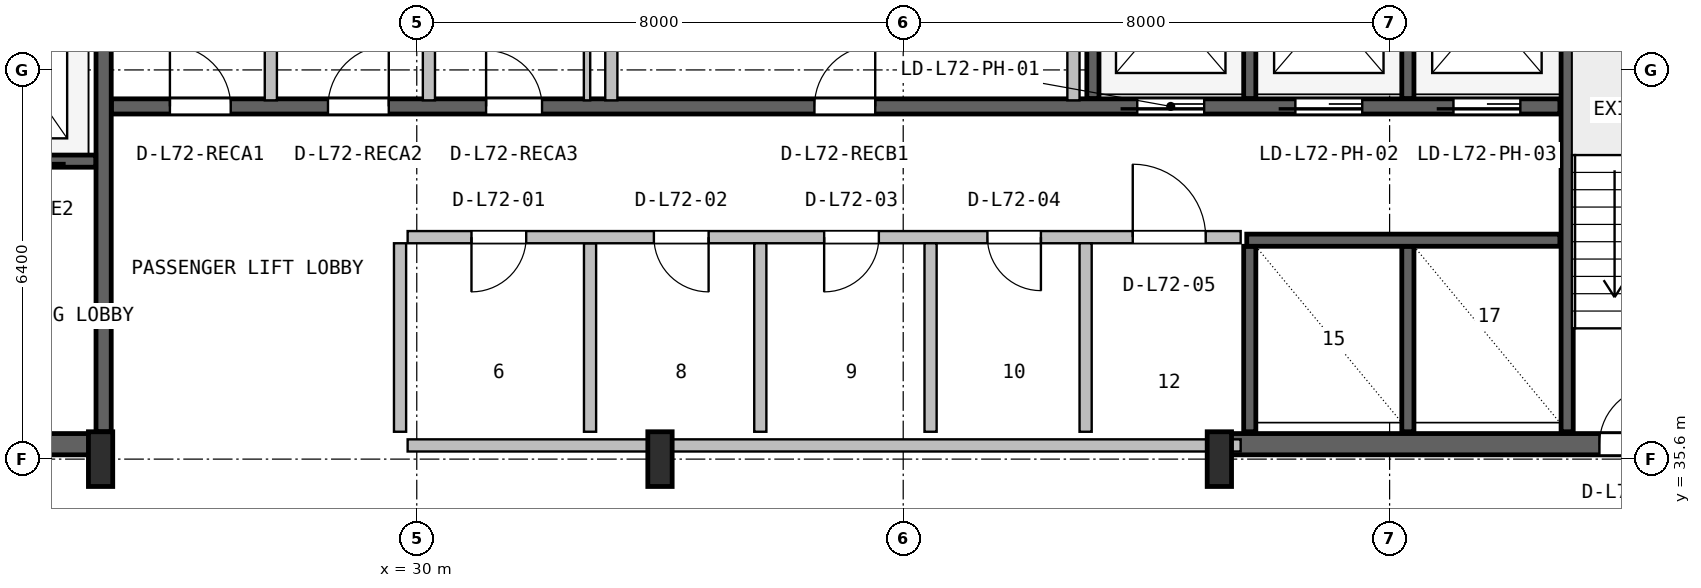
"""IFC4 building model, lengths in metres.
Left out: names, types, materials, properties, quantities, classifications, styles, units other than length and angle.
Written with IfcOpenShell. Run it as: python <this file> out.ifc"""

import sys

from ifc_helpers import new_model, si_unit, direction, frame, frame_2d, origin, origin_2d, place, context, subcontext, project, spatial, rectangle, i_section, extrude, source, transform, mapped, element, fill, save


model = new_model("IFC4")
c1 = context("Model", 3, precision=1e-05, world=origin(), true_north=direction((0.0, 1.0)))
c2 = subcontext(c1, "Body", "Model", "MODEL_VIEW")
j1 = project(units=[si_unit("LENGTHUNIT", "METRE"), si_unit("PLANEANGLEUNIT", "RADIAN")], contexts=[c1])
p1 = place(None, origin())
s1 = spatial("IfcSite", under=j1, at=p1, CompositionType="ELEMENT")
p2 = place(p1, origin())
s2 = spatial("IfcBuilding", under=s1, at=p2, CompositionType="ELEMENT")
p3 = place(p2, frame((0.0, 0.0, 288.8)))
s3 = spatial("IfcBuildingStorey", under=s2, at=p3, CompositionType="ELEMENT", Elevation=288.8)
p4 = place(p3, frame((15.67, 35.845, 0.0), z_axis=(0.0, 0.0, 1.0), x_axis=(1.0, 0.0, 0.0)))
e1 = element("IfcWall", 1, at=p4, inside=s3, PredefinedType="SHEAR", context=c2, shape_type="SweptSolid", body=[
    extrude(rectangle(XDim=9.13, YDim=0.35, at=frame_2d((4.565, 0.0))), origin(), (0.0, 0.0, 1.0), 3.55),
])
p5 = place(p4, frame((5.4, 0.0, 0.0)))
e2 = element("IfcOpeningElement", 2, at=p5, cuts=e1, PredefinedType="OPENING", context=c2, shape_type="SweptSolid", body=[
    extrude(rectangle(XDim=1.0, YDim=2.1, at=frame_2d((0.5, 1.05))), frame((0.0, 0.185, 0.0), z_axis=(0.0, -1.0, 0.0), x_axis=(1.0, 0.0, 0.0)), (0.0, 0.0, 1.0), 0.37),
])
p6 = place(p3, frame((43.2, 35.845, 0.0), z_axis=(0.0, 0.0, 1.0), x_axis=(1.0, 0.0, 0.0)))
e3 = element("IfcWall", 3, at=p6, inside=s3, PredefinedType="SHEAR", context=c2, shape_type="SweptSolid", body=[
    extrude(rectangle(XDim=9.13, YDim=0.35, at=frame_2d((4.565, 0.0))), origin(), (0.0, 0.0, 1.0), 3.55),
])
p7 = place(p6, frame((6.25, 0.0, 0.0)))
e4 = element("IfcOpeningElement", 4, at=p7, cuts=e3, PredefinedType="OPENING", context=c2, shape_type="SweptSolid", body=[
    extrude(rectangle(XDim=0.95, YDim=2.1, at=frame_2d((0.475, 1.05))), frame((0.0, 0.185, 0.0), z_axis=(0.0, -1.0, 0.0), x_axis=(1.0, 0.0, 0.0)), (0.0, 0.0, 1.0), 0.37),
])
m1 = source(origin(), c2, "Body", "SweptSolid", [
    extrude(i_section(OverallWidth=0.4, OverallDepth=0.9, WebThickness=0.016, FlangeThickness=0.028, FilletRadius=0.016, at=origin_2d()), origin(), (0.0, 0.0, 1.0), 3.8),
])
for number, where, z_axis, x_axis in (
    (5, (24.8, 35.6, 0.0), (0.0, 0.0, 1.0), (1.0, 0.0, 0.0)),
    (6, (34.0, 35.6, 0.0), (0.0, 0.0, 1.0), (1.0, 0.0, 0.0)),
    (7, (43.2, 35.6, 0.0), (0.0, 0.0, 1.0), (1.0, 0.0, 0.0)),
):
    element("IfcColumn", number, at=place(p3, frame(where, z_axis=z_axis, x_axis=x_axis)), inside=s3, PredefinedType="COLUMN", context=c2, shape_type="MappedRepresentation", body=[
        mapped(m1, transform((0.0, 0.0, 0.0), x_axis=(1.0, 0.0, 0.0), y_axis=(0.0, 1.0, 0.0), z_axis=(0.0, 0.0, 1.0), scale=1.0)),
    ])
p8 = place(p3, frame((24.85, 36.05, 0.0), z_axis=(0.0, 0.0, 1.0), x_axis=(0.0, 1.0, 0.0)))
e8 = element("IfcWall", 8, at=p8, inside=s3, PredefinedType="SHEAR", context=c2, shape_type="SweptSolid", body=[
    extrude(rectangle(XDim=10.45, YDim=0.25, at=frame_2d((5.225, 0.0))), origin(), (0.0, 0.0, 1.0), 3.55),
])
p9 = place(p3, frame((19.2, 40.5, 0.0), z_axis=(0.0, 0.0, 1.0), x_axis=(1.0, 0.0, 0.0)))
e9 = element("IfcWall", 9, at=p9, inside=s3, PredefinedType="SHEAR", context=c2, shape_type="SweptSolid", body=[
    extrude(rectangle(XDim=5.52, YDim=0.2, at=frame_2d((2.76, 0.0))), origin(), (0.0, 0.0, 1.0), 3.55),
])
p10 = place(p9, frame((1.05, 0.0, 0.0)))
e10 = element("IfcOpeningElement", 10, at=p10, cuts=e9, PredefinedType="OPENING", context=c2, shape_type="SweptSolid", body=[
    extrude(rectangle(XDim=1.1, YDim=2.18, at=frame_2d((0.55, 1.09))), frame((0.0, 0.11, 0.0), z_axis=(0.0, -1.0, 0.0), x_axis=(1.0, 0.0, 0.0)), (0.0, 0.0, 1.0), 0.22),
])
p11 = place(p9, frame((3.65, 0.0, 0.0)))
e11 = element("IfcOpeningElement", 11, at=p11, cuts=e9, PredefinedType="OPENING", context=c2, shape_type="SweptSolid", body=[
    extrude(rectangle(XDim=1.1, YDim=2.18, at=frame_2d((0.55, 1.09))), frame((0.0, 0.11, 0.0), z_axis=(0.0, -1.0, 0.0), x_axis=(1.0, 0.0, 0.0)), (0.0, 0.0, 1.0), 0.22),
])
p12 = place(p3, frame((48.92, 36.05, 0.0), z_axis=(0.0, 0.0, 1.0), x_axis=(0.0, 1.0, 0.0)))
e12 = element("IfcWall", 12, at=p12, inside=s3, PredefinedType="SHEAR", context=c2, shape_type="SweptSolid", body=[
    extrude(rectangle(XDim=10.5, YDim=0.2, at=frame_2d((5.25, 0.0))), origin(), (0.0, 0.0, 1.0), 3.55),
])
p13 = place(p3, frame((24.98, 41.4, 0.0), z_axis=(0.0, 0.0, 1.0), x_axis=(1.0, 0.0, 0.0)))
e13 = element("IfcWall", 13, at=p13, inside=s3, PredefinedType="SHEAR", context=c2, shape_type="SweptSolid", body=[
    extrude(rectangle(XDim=23.82, YDim=0.25, at=frame_2d((11.91, 0.0))), origin(), (0.0, 0.0, 1.0), 3.55),
])
p14 = place(p13, frame((16.87, 0.0, 0.0)))
e14 = element("IfcOpeningElement", 14, at=p14, cuts=e13, PredefinedType="OPENING", context=c2, shape_type="SweptSolid", body=[
    extrude(rectangle(XDim=1.1, YDim=2.18, at=frame_2d((0.55, 1.09))), frame((0.0, 0.135, 0.0), z_axis=(0.0, -1.0, 0.0), x_axis=(1.0, 0.0, 0.0)), (0.0, 0.0, 1.0), 0.27),
])
p15 = place(p13, frame((19.47, 0.0, 0.0)))
e15 = element("IfcOpeningElement", 15, at=p15, cuts=e13, PredefinedType="OPENING", context=c2, shape_type="SweptSolid", body=[
    extrude(rectangle(XDim=1.1, YDim=2.18, at=frame_2d((0.55, 1.09))), frame((0.0, 0.135, 0.0), z_axis=(0.0, -1.0, 0.0), x_axis=(1.0, 0.0, 0.0)), (0.0, 0.0, 1.0), 0.27),
])
p16 = place(p13, frame((22.07, 0.0, 0.0)))
e16 = element("IfcOpeningElement", 16, at=p16, cuts=e13, PredefinedType="OPENING", context=c2, shape_type="SweptSolid", body=[
    extrude(rectangle(XDim=1.1, YDim=2.18, at=frame_2d((0.55, 1.09))), frame((0.0, 0.135, 0.0), z_axis=(0.0, -1.0, 0.0), x_axis=(1.0, 0.0, 0.0)), (0.0, 0.0, 1.0), 0.27),
])
p17 = place(p13, frame((0.96, 0.0, 0.0)))
e17 = element("IfcOpeningElement", 17, at=p17, cuts=e13, PredefinedType="OPENING", context=c2, shape_type="SweptSolid", body=[
    extrude(rectangle(XDim=1.0, YDim=2.08, at=frame_2d((0.5, 1.04))), frame((0.0, 0.135, 0.0), z_axis=(0.0, -1.0, 0.0), x_axis=(1.0, 0.0, 0.0)), (0.0, 0.0, 1.0), 0.27),
])
p18 = place(p13, frame((3.56, 0.0, 0.0)))
e18 = element("IfcOpeningElement", 18, at=p18, cuts=e13, PredefinedType="OPENING", context=c2, shape_type="SweptSolid", body=[
    extrude(rectangle(XDim=1.0, YDim=2.08, at=frame_2d((0.5, 1.04))), frame((0.0, 0.135, 0.0), z_axis=(0.0, -1.0, 0.0), x_axis=(1.0, 0.0, 0.0)), (0.0, 0.0, 1.0), 0.27),
])
p19 = place(p13, frame((6.16, 0.0, 0.0)))
e19 = element("IfcOpeningElement", 19, at=p19, cuts=e13, PredefinedType="OPENING", context=c2, shape_type="SweptSolid", body=[
    extrude(rectangle(XDim=0.92, YDim=2.08, at=frame_2d((0.46, 1.04))), frame((0.0, 0.135, 0.0), z_axis=(0.0, -1.0, 0.0), x_axis=(1.0, 0.0, 0.0)), (0.0, 0.0, 1.0), 0.27),
])
p20 = place(p13, frame((11.56, 0.0, 0.0)))
e20 = element("IfcOpeningElement", 20, at=p20, cuts=e13, PredefinedType="OPENING", context=c2, shape_type="SweptSolid", body=[
    extrude(rectangle(XDim=1.0, YDim=2.08, at=frame_2d((0.5, 1.04))), frame((0.0, 0.135, 0.0), z_axis=(0.0, -1.0, 0.0), x_axis=(1.0, 0.0, 0.0)), (0.0, 0.0, 1.0), 0.27),
])
p21 = place(p3, frame((41.12, 41.53, 0.0), z_axis=(0.0, 0.0, 1.0), x_axis=(0.0, 1.0, 0.0)))
e21 = element("IfcWall", 21, at=p21, inside=s3, PredefinedType="SHEAR", context=c2, shape_type="SweptSolid", body=[
    extrude(rectangle(XDim=5.02, YDim=0.2, at=frame_2d((2.51, 0.0))), origin(), (0.0, 0.0, 1.0), 3.55),
])
for number, where, z_axis, x_axis in (
    (22, (43.7, 41.53, 0.0), (0.0, 0.0, 1.0), (0.0, 1.0, 0.0)),
    (23, (46.3, 41.53, 0.0), (0.0, 0.0, 1.0), (0.0, 1.0, 0.0)),
):
    element("IfcWall", number, at=place(p3, frame(where, z_axis=z_axis, x_axis=x_axis)), inside=s3, PredefinedType="SHEAR", context=c2, shape_type="SweptSolid", body=[
        extrude(rectangle(XDim=2.87, YDim=0.2, at=frame_2d((1.435, 0.0))), origin(), (0.0, 0.0, 1.0), 3.55),
    ])
for number, where, z_axis, x_axis in (
    (24, (43.7, 36.05, 0.0), (0.0, 0.0, 1.0), (0.0, 1.0, 0.0)),
    (25, (46.3, 36.05, 0.0), (0.0, 0.0, 1.0), (0.0, 1.0, 0.0)),
):
    element("IfcWall", number, at=place(p3, frame(where, z_axis=z_axis, x_axis=x_axis)), inside=s3, PredefinedType="SHEAR", context=c2, shape_type="SweptSolid", body=[
        extrude(rectangle(XDim=3.05, YDim=0.2, at=frame_2d((1.525, 0.0))), origin(), (0.0, 0.0, 1.0), 3.55),
    ])
p22 = place(p3, frame((43.65, 39.2, 0.0), z_axis=(0.0, 0.0, 1.0), x_axis=(1.0, 0.0, 0.0)))
e26 = element("IfcWall", 26, at=p22, inside=s3, PredefinedType="SHEAR", context=c2, shape_type="SweptSolid", body=[
    extrude(rectangle(XDim=5.15, YDim=0.2, at=frame_2d((2.575, 0.0))), origin(), (0.0, 0.0, 1.0), 3.55),
])
p23 = place(p3, frame((29.85, 35.825, 0.0), z_axis=(0.0, 0.0, 1.0), x_axis=(1.0, 0.0, 0.0)))
e27 = element("IfcWall", 27, at=p23, inside=s3, PredefinedType="SOLIDWALL", context=c2, shape_type="SweptSolid", body=[
    extrude(rectangle(XDim=13.7, YDim=0.2, at=frame_2d((6.85, 0.0))), origin(), (0.0, 0.0, 1.0), 2.575),
])
p24 = place(p3, frame((32.85, 36.05, 0.0), z_axis=(0.0, 0.0, 1.0), x_axis=(0.0, 1.0, 0.0)))
e28 = element("IfcWall", 28, at=p24, inside=s3, PredefinedType="PLUMBINGWALL", context=c2, shape_type="SweptSolid", body=[
    extrude(rectangle(XDim=3.1, YDim=0.2, at=frame_2d((1.55, 0.0))), origin(), (0.0, 0.0, 1.0), 3.53),
])
p25 = place(p3, frame((29.85, 39.25, 0.0), z_axis=(0.0, 0.0, 1.0), x_axis=(1.0, 0.0, 0.0)))
e29 = element("IfcWall", 29, at=p25, inside=s3, PredefinedType="SOLIDWALL", context=c2, shape_type="SweptSolid", body=[
    extrude(rectangle(XDim=13.7, YDim=0.2, at=frame_2d((6.85, 0.0))), origin(), (0.0, 0.0, 1.0), 3.53),
])
p26 = place(p25, frame((1.05, 0.0, 0.0)))
e30 = element("IfcOpeningElement", 30, at=p26, cuts=e29, PredefinedType="OPENING", context=c2, shape_type="SweptSolid", body=[
    extrude(rectangle(XDim=0.9, YDim=2.06, at=frame_2d((0.45, 1.03))), frame((0.0, 0.11, 0.0), z_axis=(0.0, -1.0, 0.0), x_axis=(1.0, 0.0, 0.0)), (0.0, 0.0, 1.0), 0.22),
])
p27 = place(p25, frame((4.05, 0.0, 0.0)))
e31 = element("IfcOpeningElement", 31, at=p27, cuts=e29, PredefinedType="OPENING", context=c2, shape_type="SweptSolid", body=[
    extrude(rectangle(XDim=0.9, YDim=2.06, at=frame_2d((0.45, 1.03))), frame((0.0, 0.11, 0.0), z_axis=(0.0, -1.0, 0.0), x_axis=(1.0, 0.0, 0.0)), (0.0, 0.0, 1.0), 0.22),
])
p28 = place(p25, frame((6.85, 0.0, 0.0)))
e32 = element("IfcOpeningElement", 32, at=p28, cuts=e29, PredefinedType="OPENING", context=c2, shape_type="SweptSolid", body=[
    extrude(rectangle(XDim=0.9, YDim=2.06, at=frame_2d((0.45, 1.03))), frame((0.0, 0.11, 0.0), z_axis=(0.0, -1.0, 0.0), x_axis=(1.0, 0.0, 0.0)), (0.0, 0.0, 1.0), 0.22),
])
p29 = place(p25, frame((9.535, 0.0, 0.0)))
e33 = element("IfcOpeningElement", 33, at=p29, cuts=e29, PredefinedType="OPENING", context=c2, shape_type="SweptSolid", body=[
    extrude(rectangle(XDim=0.88, YDim=2.06, at=frame_2d((0.44, 1.03))), frame((0.0, 0.11, 0.0), z_axis=(0.0, -1.0, 0.0), x_axis=(1.0, 0.0, 0.0)), (0.0, 0.0, 1.0), 0.22),
])
p30 = place(p25, frame((11.925, 0.0, 0.0)))
e34 = element("IfcOpeningElement", 34, at=p30, cuts=e29, PredefinedType="OPENING", context=c2, shape_type="SweptSolid", body=[
    extrude(rectangle(XDim=1.2, YDim=2.1, at=frame_2d((0.6, 1.05))), frame((0.0, 0.11, 0.0), z_axis=(0.0, -1.0, 0.0), x_axis=(1.0, 0.0, 0.0)), (0.0, 0.0, 1.0), 0.22),
])
for number, where, z_axis, x_axis in (
    (35, (29.725, 36.05, 0.0), (0.0, 0.0, 1.0), (0.0, 1.0, 0.0)),
    (36, (35.65, 36.05, 0.0), (0.0, 0.0, 1.0), (0.0, 1.0, 0.0)),
    (37, (38.45, 36.05, 0.0), (0.0, 0.0, 1.0), (0.0, 1.0, 0.0)),
):
    element("IfcWall", number, at=place(p3, frame(where, z_axis=z_axis, x_axis=x_axis)), inside=s3, PredefinedType="PLUMBINGWALL", context=c2, shape_type="SweptSolid", body=[
        extrude(rectangle(XDim=3.1, YDim=0.2, at=frame_2d((1.55, 0.0))), origin(), (0.0, 0.0, 1.0), 3.53),
    ])
p31 = place(p3, frame((41.0, 36.05, 0.0), z_axis=(0.0, 0.0, 1.0), x_axis=(0.0, 1.0, 0.0)))
e38 = element("IfcWall", 38, at=p31, inside=s3, PredefinedType="SOLIDWALL", context=c2, shape_type="SweptSolid", body=[
    extrude(rectangle(XDim=3.1, YDim=0.2, at=frame_2d((1.55, 0.0))), origin(), (0.0, 0.0, 1.0), 3.53),
])
for number, where, z_axis, x_axis in (
    (39, (27.6, 41.5, 0.0), (0.0, 0.0, 1.0), (0.0, 1.0, 0.0)),
    (40, (30.2, 41.5, 0.0), (0.0, 0.0, 1.0), (0.0, 1.0, 0.0)),
):
    element("IfcWall", number, at=place(p3, frame(where, z_axis=z_axis, x_axis=x_axis)), inside=s3, PredefinedType="SOLIDWALL", context=c2, shape_type="SweptSolid", body=[
        extrude(rectangle(XDim=5.02, YDim=0.2, at=frame_2d((2.51, 0.0))), origin(), (0.0, 0.0, 1.0), 3.53),
    ])
p32 = place(p3, frame((32.8, 41.5, 0.0), z_axis=(0.0, 0.0, 1.0), x_axis=(0.0, 1.0, 0.0)))
e41 = element("IfcWall", 41, at=p32, inside=s3, PredefinedType="PARTITIONING", context=c2, shape_type="SweptSolid", body=[
    extrude(rectangle(XDim=5.02, YDim=0.105, at=frame_2d((2.51, 0.0))), origin(), (0.0, 0.0, 1.0), 3.53),
])
for number, where, z_axis, x_axis in (
    (42, (40.8, 41.5, 0.0), (0.0, 0.0, 1.0), (0.0, 1.0, 0.0)),
    (43, (33.2, 41.5, 0.0), (0.0, 0.0, 1.0), (0.0, 1.0, 0.0)),
):
    element("IfcWall", number, at=place(p3, frame(where, z_axis=z_axis, x_axis=x_axis)), inside=s3, PredefinedType="SOLIDWALL", context=c2, shape_type="SweptSolid", body=[
        extrude(rectangle(XDim=5.02, YDim=0.2, at=frame_2d((2.51, 0.0))), origin(), (0.0, 0.0, 1.0), 3.53),
    ])
m2 = source(origin(), c2, "Body", "SweptSolid", [
    extrude(rectangle(XDim=0.95, YDim=2.1, at=frame_2d((0.475, 1.05))), frame((0.0, 0.025, 0.0), z_axis=(0.0, -1.0, 0.0), x_axis=(1.0, 0.0, 0.0)), (0.0, 0.0, 1.0), 0.05),
])
p33 = place(p7, origin())
e44 = element("IfcDoor", 44, at=p33, inside=s3, OperationType="SINGLE_SWING_RIGHT", PredefinedType="DOOR", context=c2, shape_type="MappedRepresentation", body=[
    mapped(m2, transform((0.0, 0.0, 0.0), x_axis=(1.0, 0.0, 0.0), y_axis=(0.0, 1.0, 0.0), z_axis=(0.0, 0.0, 1.0), scale=1.0)),
])
fill(e4, e44)
m3 = source(origin(), c2, "Body", "SweptSolid", [
    extrude(rectangle(XDim=1.1, YDim=2.18, at=frame_2d((0.55, 1.09))), frame((0.0, 0.025, 0.0), z_axis=(0.0, -1.0, 0.0), x_axis=(1.0, 0.0, 0.0)), (0.0, 0.0, 1.0), 0.05),
])
p34 = place(p14, frame((1.1, 0.0, 0.0), z_axis=(0.0, 0.0, 1.0), x_axis=(-1.0, 0.0, 0.0)))
e45 = element("IfcDoor", 45, at=p34, inside=s3, OperationType="SLIDING_TO_LEFT", PredefinedType="DOOR", context=c2, shape_type="MappedRepresentation", body=[
    mapped(m3, transform((0.0, 0.0, 0.0), x_axis=(1.0, 0.0, 0.0), y_axis=(0.0, 1.0, 0.0), z_axis=(0.0, 0.0, 1.0), scale=1.0)),
])
fill(e14, e45)
p35 = place(p15, frame((1.1, 0.0, 0.0), z_axis=(0.0, 0.0, 1.0), x_axis=(-1.0, 0.0, 0.0)))
e46 = element("IfcDoor", 46, at=p35, inside=s3, OperationType="SLIDING_TO_LEFT", PredefinedType="DOOR", context=c2, shape_type="MappedRepresentation", body=[
    mapped(m3, transform((0.0, 0.0, 0.0), x_axis=(1.0, 0.0, 0.0), y_axis=(0.0, 1.0, 0.0), z_axis=(0.0, 0.0, 1.0), scale=1.0)),
])
fill(e15, e46)
p36 = place(p16, frame((1.1, 0.0, 0.0), z_axis=(0.0, 0.0, 1.0), x_axis=(-1.0, 0.0, 0.0)))
e47 = element("IfcDoor", 47, at=p36, inside=s3, OperationType="SLIDING_TO_LEFT", PredefinedType="DOOR", context=c2, shape_type="MappedRepresentation", body=[
    mapped(m3, transform((0.0, 0.0, 0.0), x_axis=(1.0, 0.0, 0.0), y_axis=(0.0, 1.0, 0.0), z_axis=(0.0, 0.0, 1.0), scale=1.0)),
])
fill(e16, e47)
m4 = source(origin(), c2, "Body", "SweptSolid", [
    extrude(rectangle(XDim=1.0, YDim=2.08, at=frame_2d((0.5, 1.04))), frame((0.0, 0.025, 0.0), z_axis=(0.0, -1.0, 0.0), x_axis=(1.0, 0.0, 0.0)), (0.0, 0.0, 1.0), 0.05),
])
p37 = place(p17, origin())
e48 = element("IfcDoor", 48, at=p37, inside=s3, OperationType="SINGLE_SWING_LEFT", PredefinedType="DOOR", context=c2, shape_type="MappedRepresentation", body=[
    mapped(m4, transform((0.0, 0.0, 0.0), x_axis=(1.0, 0.0, 0.0), y_axis=(0.0, 1.0, 0.0), z_axis=(0.0, 0.0, 1.0), scale=1.0)),
])
fill(e17, e48)
p38 = place(p18, origin())
e49 = element("IfcDoor", 49, at=p38, inside=s3, OperationType="SINGLE_SWING_RIGHT", PredefinedType="DOOR", context=c2, shape_type="MappedRepresentation", body=[
    mapped(m4, transform((0.0, 0.0, 0.0), x_axis=(1.0, 0.0, 0.0), y_axis=(0.0, 1.0, 0.0), z_axis=(0.0, 0.0, 1.0), scale=1.0)),
])
fill(e18, e49)
m5 = source(origin(), c2, "Body", "SweptSolid", [
    extrude(rectangle(XDim=0.92, YDim=2.08, at=frame_2d((0.46, 1.04))), frame((0.0, 0.025, 0.0), z_axis=(0.0, -1.0, 0.0), x_axis=(1.0, 0.0, 0.0)), (0.0, 0.0, 1.0), 0.05),
])
p39 = place(p19, origin())
e50 = element("IfcDoor", 50, at=p39, inside=s3, OperationType="SINGLE_SWING_LEFT", PredefinedType="DOOR", context=c2, shape_type="MappedRepresentation", body=[
    mapped(m5, transform((0.0, 0.0, 0.0), x_axis=(1.0, 0.0, 0.0), y_axis=(0.0, 1.0, 0.0), z_axis=(0.0, 0.0, 1.0), scale=1.0)),
])
fill(e19, e50)
p40 = place(p20, origin())
e51 = element("IfcDoor", 51, at=p40, inside=s3, OperationType="SINGLE_SWING_RIGHT", PredefinedType="DOOR", context=c2, shape_type="MappedRepresentation", body=[
    mapped(m4, transform((0.0, 0.0, 0.0), x_axis=(1.0, 0.0, 0.0), y_axis=(0.0, 1.0, 0.0), z_axis=(0.0, 0.0, 1.0), scale=1.0)),
])
fill(e20, e51)
m6 = source(origin(), c2, "Body", "SweptSolid", [
    extrude(rectangle(XDim=0.9, YDim=2.06, at=frame_2d((0.45, 1.03))), frame((0.0, 0.025, 0.0), z_axis=(0.0, -1.0, 0.0), x_axis=(1.0, 0.0, 0.0)), (0.0, 0.0, 1.0), 0.05),
])
p41 = place(p26, frame((0.9, 0.0, 0.0), z_axis=(0.0, 0.0, 1.0), x_axis=(-1.0, 0.0, 0.0)))
e52 = element("IfcDoor", 52, at=p41, inside=s3, OperationType="SINGLE_SWING_LEFT", PredefinedType="DOOR", context=c2, shape_type="MappedRepresentation", body=[
    mapped(m6, transform((0.0, 0.0, 0.0), x_axis=(1.0, 0.0, 0.0), y_axis=(0.0, 1.0, 0.0), z_axis=(0.0, 0.0, 1.0), scale=1.0)),
])
fill(e30, e52)
p42 = place(p27, frame((0.9, 0.0, 0.0), z_axis=(0.0, 0.0, 1.0), x_axis=(-1.0, 0.0, 0.0)))
e53 = element("IfcDoor", 53, at=p42, inside=s3, OperationType="SINGLE_SWING_RIGHT", PredefinedType="DOOR", context=c2, shape_type="MappedRepresentation", body=[
    mapped(m6, transform((0.0, 0.0, 0.0), x_axis=(1.0, 0.0, 0.0), y_axis=(0.0, 1.0, 0.0), z_axis=(0.0, 0.0, 1.0), scale=1.0)),
])
fill(e31, e53)
p43 = place(p28, frame((0.9, 0.0, 0.0), z_axis=(0.0, 0.0, 1.0), x_axis=(-1.0, 0.0, 0.0)))
e54 = element("IfcDoor", 54, at=p43, inside=s3, OperationType="SINGLE_SWING_LEFT", PredefinedType="DOOR", context=c2, shape_type="MappedRepresentation", body=[
    mapped(m6, transform((0.0, 0.0, 0.0), x_axis=(1.0, 0.0, 0.0), y_axis=(0.0, 1.0, 0.0), z_axis=(0.0, 0.0, 1.0), scale=1.0)),
])
fill(e32, e54)
m7 = source(origin(), c2, "Body", "SweptSolid", [
    extrude(rectangle(XDim=0.88, YDim=2.06, at=frame_2d((0.44, 1.03))), frame((0.0, 0.025, 0.0), z_axis=(0.0, -1.0, 0.0), x_axis=(1.0, 0.0, 0.0)), (0.0, 0.0, 1.0), 0.05),
])
p44 = place(p29, frame((0.88, 0.0, 0.0), z_axis=(0.0, 0.0, 1.0), x_axis=(-1.0, 0.0, 0.0)))
e55 = element("IfcDoor", 55, at=p44, inside=s3, OperationType="SINGLE_SWING_RIGHT", PredefinedType="DOOR", context=c2, shape_type="MappedRepresentation", body=[
    mapped(m7, transform((0.0, 0.0, 0.0), x_axis=(1.0, 0.0, 0.0), y_axis=(0.0, 1.0, 0.0), z_axis=(0.0, 0.0, 1.0), scale=1.0)),
])
fill(e33, e55)
m8 = source(origin(), c2, "Body", "SweptSolid", [
    extrude(rectangle(XDim=1.2, YDim=2.1, at=frame_2d((0.6, 1.05))), frame((0.0, 0.025, 0.0), z_axis=(0.0, -1.0, 0.0), x_axis=(1.0, 0.0, 0.0)), (0.0, 0.0, 1.0), 0.05),
])
p45 = place(p30, origin())
e56 = element("IfcDoor", 56, at=p45, inside=s3, OperationType="SINGLE_SWING_LEFT", PredefinedType="DOOR", context=c2, shape_type="MappedRepresentation", body=[
    mapped(m8, transform((0.0, 0.0, 0.0), x_axis=(1.0, 0.0, 0.0), y_axis=(0.0, 1.0, 0.0), z_axis=(0.0, 0.0, 1.0), scale=1.0)),
])
fill(e34, e56)
save(model, sys.argv[1])
